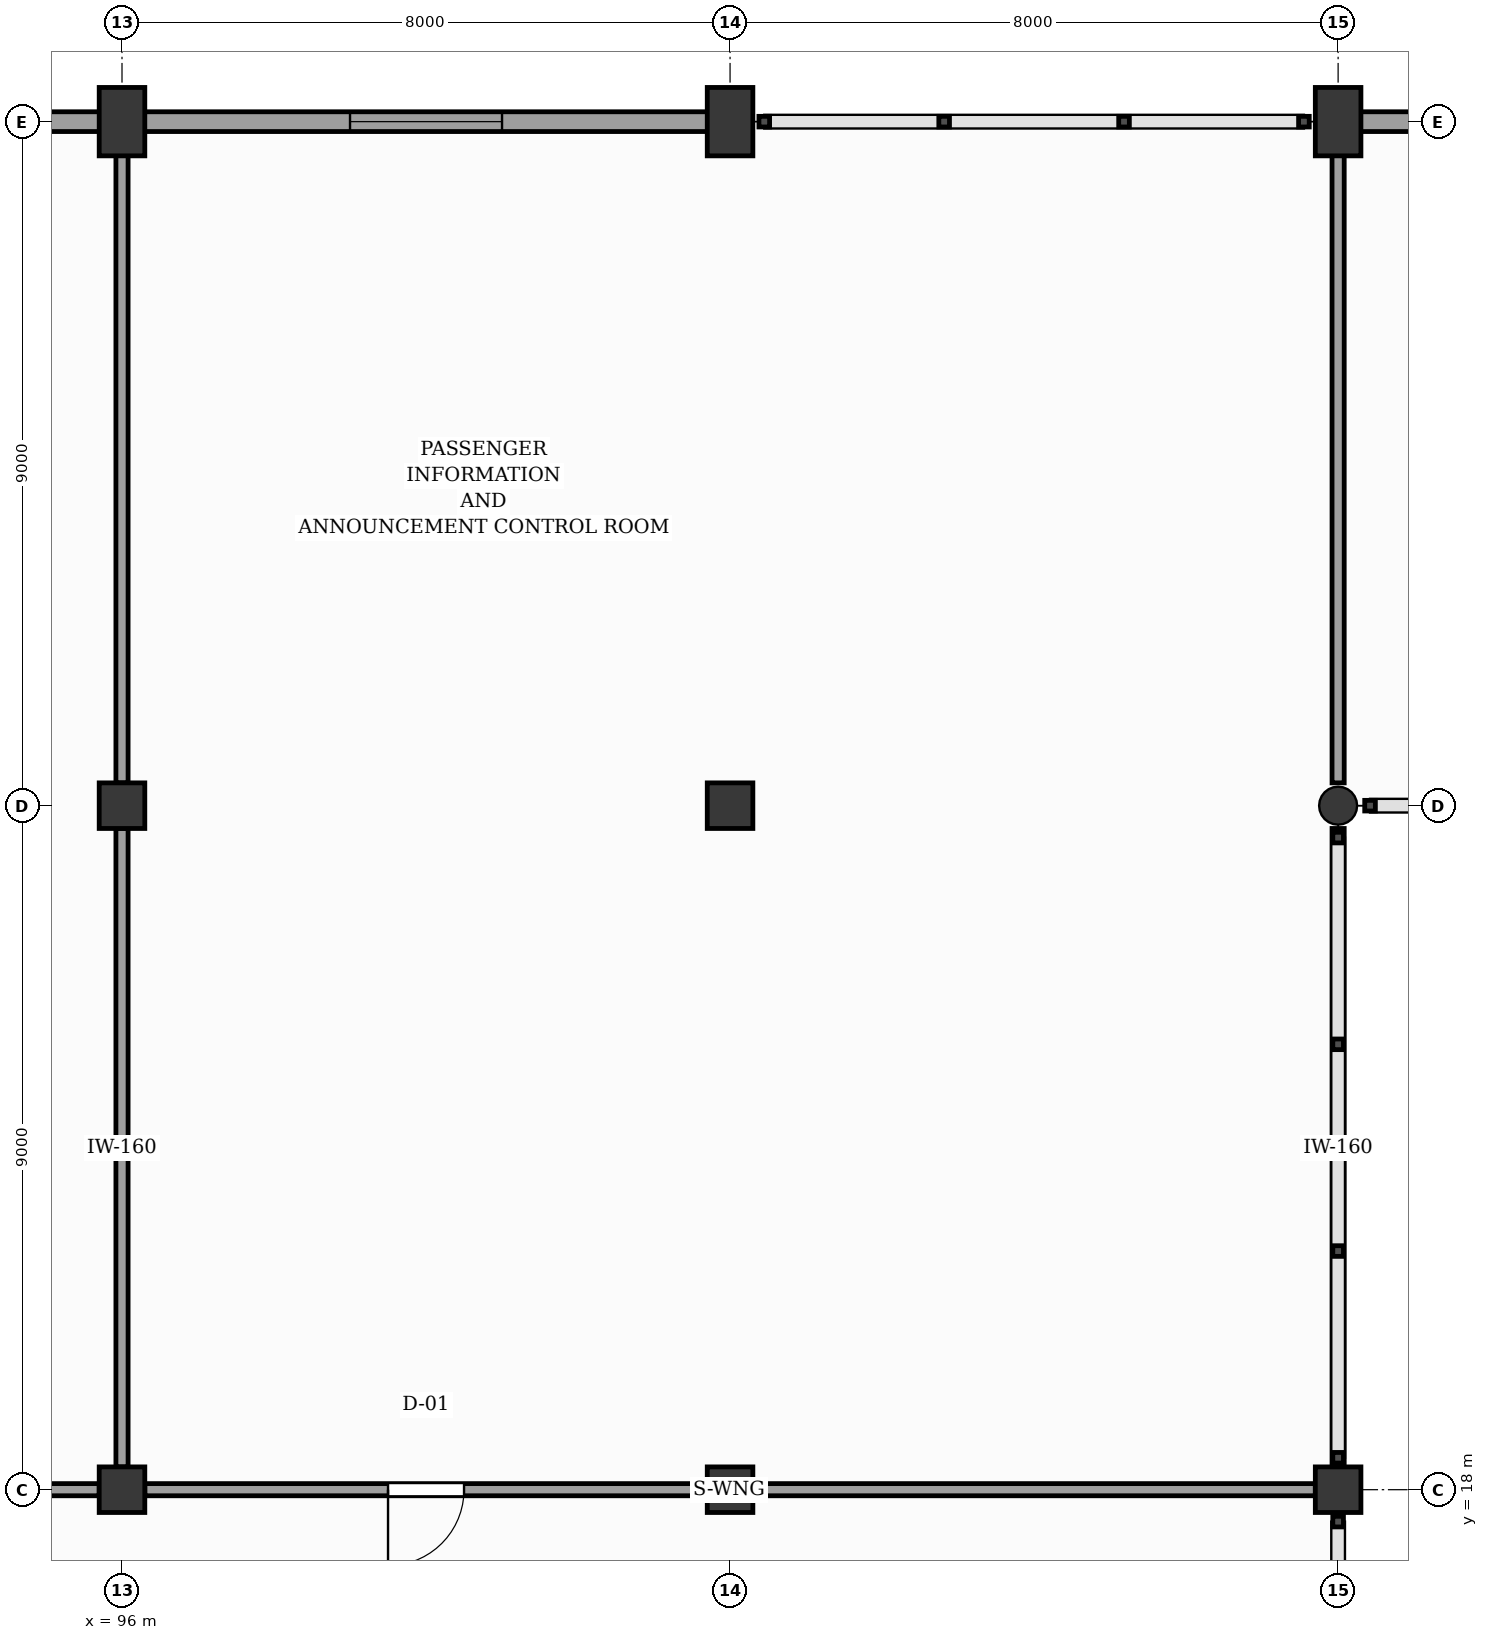
"""IFC4 building model, lengths in metres.
Left out: names, types, materials, properties, quantities, classifications, styles, units other than length and angle.
Written with IfcOpenShell. Run it as: python <this file> out.ifc"""

import sys

from ifc_helpers import new_model, si_unit, direction, frame, frame_2d, origin, origin_2d, place, context, subcontext, project, spatial, rectangle, circle, extrude, element, fill, save


model = new_model("IFC4")
c1 = context("Model", 3, precision=1e-05, world=origin(), true_north=direction((0.0, 1.0)))
c2 = subcontext(c1, "Body", "Model", "MODEL_VIEW")
j1 = project(units=[si_unit("LENGTHUNIT", "METRE"), si_unit("PLANEANGLEUNIT", "RADIAN")], contexts=[c1])
p1 = place(None, origin())
s1 = spatial("IfcSite", under=j1, at=p1, CompositionType="ELEMENT")
p2 = place(p1, origin())
s2 = spatial("IfcBuilding", under=s1, at=p2, CompositionType="ELEMENT")
p3 = place(p2, frame((0.0, 0.0, 16.2)))
s3 = spatial("IfcBuildingStorey", under=s2, at=p3, CompositionType="ELEMENT", Elevation=16.2)
for number, where, z_axis, x_axis in (
    (1, (96.0, 18.0, 0.0), (0.0, 0.0, 1.0), (1.0, 0.0, 0.0)),
    (2, (96.0, 27.0, 0.0), (0.0, 0.0, 1.0), (1.0, 0.0, 0.0)),
):
    element("IfcColumn", number, at=place(p3, frame(where, z_axis=z_axis, x_axis=x_axis)), inside=s3, PredefinedType="COLUMN", context=c2, shape_type="SweptSolid", body=[
        extrude(rectangle(XDim=0.6, YDim=0.6, at=origin_2d()), origin(), (0.0, 0.0, 1.0), 4.2),
    ])
p4 = place(p3, frame((96.0, 36.0, 0.0), z_axis=(0.0, 0.0, 1.0), x_axis=(1.0, 0.0, 0.0)))
e3 = element("IfcColumn", 3, at=p4, inside=s3, PredefinedType="COLUMN", context=c2, shape_type="SweptSolid", body=[
    extrude(rectangle(XDim=0.6, YDim=0.9, at=origin_2d()), origin(), (0.0, 0.0, 1.0), 4.2),
])
for number, where, z_axis, x_axis in (
    (4, (104.0, 18.0, 0.0), (0.0, 0.0, 1.0), (1.0, 0.0, 0.0)),
    (5, (104.0, 27.0, 0.0), (0.0, 0.0, 1.0), (1.0, 0.0, 0.0)),
):
    element("IfcColumn", number, at=place(p3, frame(where, z_axis=z_axis, x_axis=x_axis)), inside=s3, PredefinedType="COLUMN", context=c2, shape_type="SweptSolid", body=[
        extrude(rectangle(XDim=0.6, YDim=0.6, at=origin_2d()), origin(), (0.0, 0.0, 1.0), 4.2),
    ])
p5 = place(p3, frame((104.0, 36.0, 0.0), z_axis=(0.0, 0.0, 1.0), x_axis=(1.0, 0.0, 0.0)))
e6 = element("IfcColumn", 6, at=p5, inside=s3, PredefinedType="COLUMN", context=c2, shape_type="SweptSolid", body=[
    extrude(rectangle(XDim=0.6, YDim=0.9, at=origin_2d()), origin(), (0.0, 0.0, 1.0), 4.2),
])
p6 = place(p3, frame((112.0, 18.0, 0.0), z_axis=(0.0, 0.0, 1.0), x_axis=(1.0, 0.0, 0.0)))
e7 = element("IfcColumn", 7, at=p6, inside=s3, PredefinedType="COLUMN", context=c2, shape_type="SweptSolid", body=[
    extrude(rectangle(XDim=0.6, YDim=0.6, at=origin_2d()), origin(), (0.0, 0.0, 1.0), 4.2),
])
p7 = place(p3, frame((112.0, 27.0, 0.0), z_axis=(0.0, 0.0, 1.0), x_axis=(1.0, 0.0, 0.0)))
e8 = element("IfcColumn", 8, at=p7, inside=s3, PredefinedType="COLUMN", context=c2, shape_type="SweptSolid", body=[
    extrude(circle(Radius=0.25, at=origin_2d()), origin(), (0.0, 0.0, 1.0), 4.2),
])
p8 = place(p3, frame((112.0, 36.0, 0.0), z_axis=(0.0, 0.0, 1.0), x_axis=(1.0, 0.0, 0.0)))
e9 = element("IfcColumn", 9, at=p8, inside=s3, PredefinedType="COLUMN", context=c2, shape_type="SweptSolid", body=[
    extrude(rectangle(XDim=0.6, YDim=0.9, at=origin_2d()), origin(), (0.0, 0.0, 1.0), 4.2),
])
p9 = place(p3, frame((88.295, 36.0, 0.0), z_axis=(0.0, 0.0, 1.0), x_axis=(1.0, 0.0, 0.0)))
e10 = element("IfcWall", 10, at=p9, inside=s3, PredefinedType="SOLIDWALL", context=c2, shape_type="SweptSolid", body=[
    extrude(rectangle(XDim=7.41, YDim=0.26, at=frame_2d((3.705, 0.0))), origin(), (0.0, 0.0, 1.0), 2.88),
])
p10 = place(p9, frame((2.705, 0.0, 1.45)))
e11 = element("IfcOpeningElement", 11, at=p10, cuts=e10, PredefinedType="OPENING", context=c2, shape_type="SweptSolid", body=[
    extrude(rectangle(XDim=2.0, YDim=1.29, at=frame_2d((1.0, 0.645))), frame((0.0, 0.14, 0.0), z_axis=(0.0, -1.0, 0.0), x_axis=(1.0, 0.0, 0.0)), (0.0, 0.0, 1.0), 0.28),
])
p11 = place(p3, frame((96.295, 36.0, 0.0), z_axis=(0.0, 0.0, 1.0), x_axis=(1.0, 0.0, 0.0)))
e12 = element("IfcWall", 12, at=p11, inside=s3, PredefinedType="SOLIDWALL", context=c2, shape_type="SweptSolid", body=[
    extrude(rectangle(XDim=7.41, YDim=0.26, at=frame_2d((3.705, 0.0))), origin(), (0.0, 0.0, 1.0), 2.88),
])
p12 = place(p11, frame((2.705, 0.0, 1.45)))
e13 = element("IfcOpeningElement", 13, at=p12, cuts=e12, PredefinedType="OPENING", context=c2, shape_type="SweptSolid", body=[
    extrude(rectangle(XDim=2.0, YDim=1.29, at=frame_2d((1.0, 0.645))), frame((0.0, 0.14, 0.0), z_axis=(0.0, -1.0, 0.0), x_axis=(1.0, 0.0, 0.0)), (0.0, 0.0, 1.0), 0.28),
])
p13 = place(p3, frame((112.295, 36.0, 0.0), z_axis=(0.0, 0.0, 1.0), x_axis=(1.0, 0.0, 0.0)))
e14 = element("IfcWall", 14, at=p13, inside=s3, PredefinedType="SOLIDWALL", context=c2, shape_type="SweptSolid", body=[
    extrude(rectangle(XDim=7.41, YDim=0.26, at=frame_2d((3.705, 0.0))), origin(), (0.0, 0.0, 1.0), 2.12),
])
p14 = place(p13, frame((2.705, 0.0, 1.23)))
e15 = element("IfcOpeningElement", 15, at=p14, cuts=e14, PredefinedType="OPENING", context=c2, shape_type="SweptSolid", body=[
    extrude(rectangle(XDim=2.0, YDim=0.75, at=frame_2d((1.0, 0.375))), frame((0.0, 0.14, 0.0), z_axis=(0.0, -1.0, 0.0), x_axis=(1.0, 0.0, 0.0)), (0.0, 0.0, 1.0), 0.28),
])
p15 = place(p3, frame((88.3, 18.0, 0.0), z_axis=(0.0, 0.0, 1.0), x_axis=(1.0, 0.0, 0.0)))
e16 = element("IfcWall", 16, at=p15, inside=s3, PredefinedType="PARTITIONING", context=c2, shape_type="SweptSolid", body=[
    extrude(rectangle(XDim=7.4, YDim=0.16, at=frame_2d((3.7, 0.0))), origin(), (0.0, 0.0, 1.0), 3.1),
])
p16 = place(p15, frame((3.2, 0.0, 0.0)))
e17 = element("IfcOpeningElement", 17, at=p16, cuts=e16, PredefinedType="OPENING", context=c2, shape_type="SweptSolid", body=[
    extrude(rectangle(XDim=1.0, YDim=2.1, at=frame_2d((0.5, 1.05))), frame((0.0, 0.09, 0.0), z_axis=(0.0, -1.0, 0.0), x_axis=(1.0, 0.0, 0.0)), (0.0, 0.0, 1.0), 0.18),
])
p17 = place(p3, frame((96.0, 18.3, 0.0), z_axis=(0.0, 0.0, 1.0), x_axis=(0.0, 1.0, 0.0)))
e18 = element("IfcWall", 18, at=p17, inside=s3, PredefinedType="PARTITIONING", context=c2, shape_type="SweptSolid", body=[
    extrude(rectangle(XDim=8.4, YDim=0.16, at=frame_2d((4.2, 0.0))), origin(), (0.0, 0.0, 1.0), 3.1),
])
p18 = place(p3, frame((96.0, 27.3, 0.0), z_axis=(0.0, 0.0, 1.0), x_axis=(0.0, 1.0, 0.0)))
e19 = element("IfcWall", 19, at=p18, inside=s3, PredefinedType="PARTITIONING", context=c2, shape_type="SweptSolid", body=[
    extrude(rectangle(XDim=8.4, YDim=0.16, at=frame_2d((4.2, 0.0))), origin(), (0.0, 0.0, 1.0), 2.88),
])
p19 = place(p3, frame((96.3, 18.0, 0.0), z_axis=(0.0, 0.0, 1.0), x_axis=(1.0, 0.0, 0.0)))
e20 = element("IfcWall", 20, at=p19, inside=s3, PredefinedType="PARTITIONING", context=c2, shape_type="SweptSolid", body=[
    extrude(rectangle(XDim=7.4, YDim=0.16, at=frame_2d((3.7, 0.0))), origin(), (0.0, 0.0, 1.0), 3.1),
])
p20 = place(p19, frame((3.2, 0.0, 0.0)))
e21 = element("IfcOpeningElement", 21, at=p20, cuts=e20, PredefinedType="OPENING", context=c2, shape_type="SweptSolid", body=[
    extrude(rectangle(XDim=1.0, YDim=2.1, at=frame_2d((0.5, 1.05))), frame((0.0, 0.09, 0.0), z_axis=(0.0, -1.0, 0.0), x_axis=(1.0, 0.0, 0.0)), (0.0, 0.0, 1.0), 0.18),
])
p21 = place(p3, frame((104.3, 18.0, 0.0), z_axis=(0.0, 0.0, 1.0), x_axis=(1.0, 0.0, 0.0)))
e22 = element("IfcWall", 22, at=p21, inside=s3, PredefinedType="PARTITIONING", context=c2, shape_type="SweptSolid", body=[
    extrude(rectangle(XDim=7.4, YDim=0.16, at=frame_2d((3.7, 0.0))), origin(), (0.0, 0.0, 1.0), 3.1),
])
p22 = place(p3, frame((112.0, 18.3, 0.0), z_axis=(0.0, 0.0, 1.0), x_axis=(0.0, 1.0, 0.0)))
e23 = element("IfcWall", 23, at=p22, inside=s3, PredefinedType="PARTITIONING", context=c2, shape_type="SweptSolid", body=[
    extrude(rectangle(XDim=8.4, YDim=0.16, at=frame_2d((4.2, 0.0))), origin(), (0.0, 0.0, 1.0), 3.1),
])
p23 = place(p3, frame((112.0, 27.3, 0.0), z_axis=(0.0, 0.0, 1.0), x_axis=(0.0, 1.0, 0.0)))
e24 = element("IfcWall", 24, at=p23, inside=s3, PredefinedType="PARTITIONING", context=c2, shape_type="SweptSolid", body=[
    extrude(rectangle(XDim=8.4, YDim=0.16, at=frame_2d((4.2, 0.0))), origin(), (0.0, 0.0, 1.0), 2.88),
])
p24 = place(p12, origin())
e25 = element("IfcWindow", 25, at=p24, inside=s3, PartitioningType="SINGLE_PANEL", PredefinedType="WINDOW", context=c2, shape_type="SweptSolid", body=[
    extrude(rectangle(XDim=2.0, YDim=1.29, at=frame_2d((1.0, 0.645))), frame((0.0, 0.03, 0.0), z_axis=(0.0, -1.0, 0.0), x_axis=(1.0, 0.0, 0.0)), (0.0, 0.0, 1.0), 0.06),
])
fill(e13, e25)
p25 = place(p20, frame((1.0, 0.0, 0.0), z_axis=(0.0, 0.0, 1.0), x_axis=(-1.0, 0.0, 0.0)))
e26 = element("IfcDoor", 26, at=p25, inside=s3, OperationType="SINGLE_SWING_LEFT", PredefinedType="DOOR", context=c2, shape_type="SweptSolid", body=[
    extrude(rectangle(XDim=1.0, YDim=2.1, at=frame_2d((0.5, 1.05))), frame((0.0, 0.025, 0.0), z_axis=(0.0, -1.0, 0.0), x_axis=(1.0, 0.0, 0.0)), (0.0, 0.0, 1.0), 0.05),
])
fill(e21, e26)
save(model, sys.argv[1])
